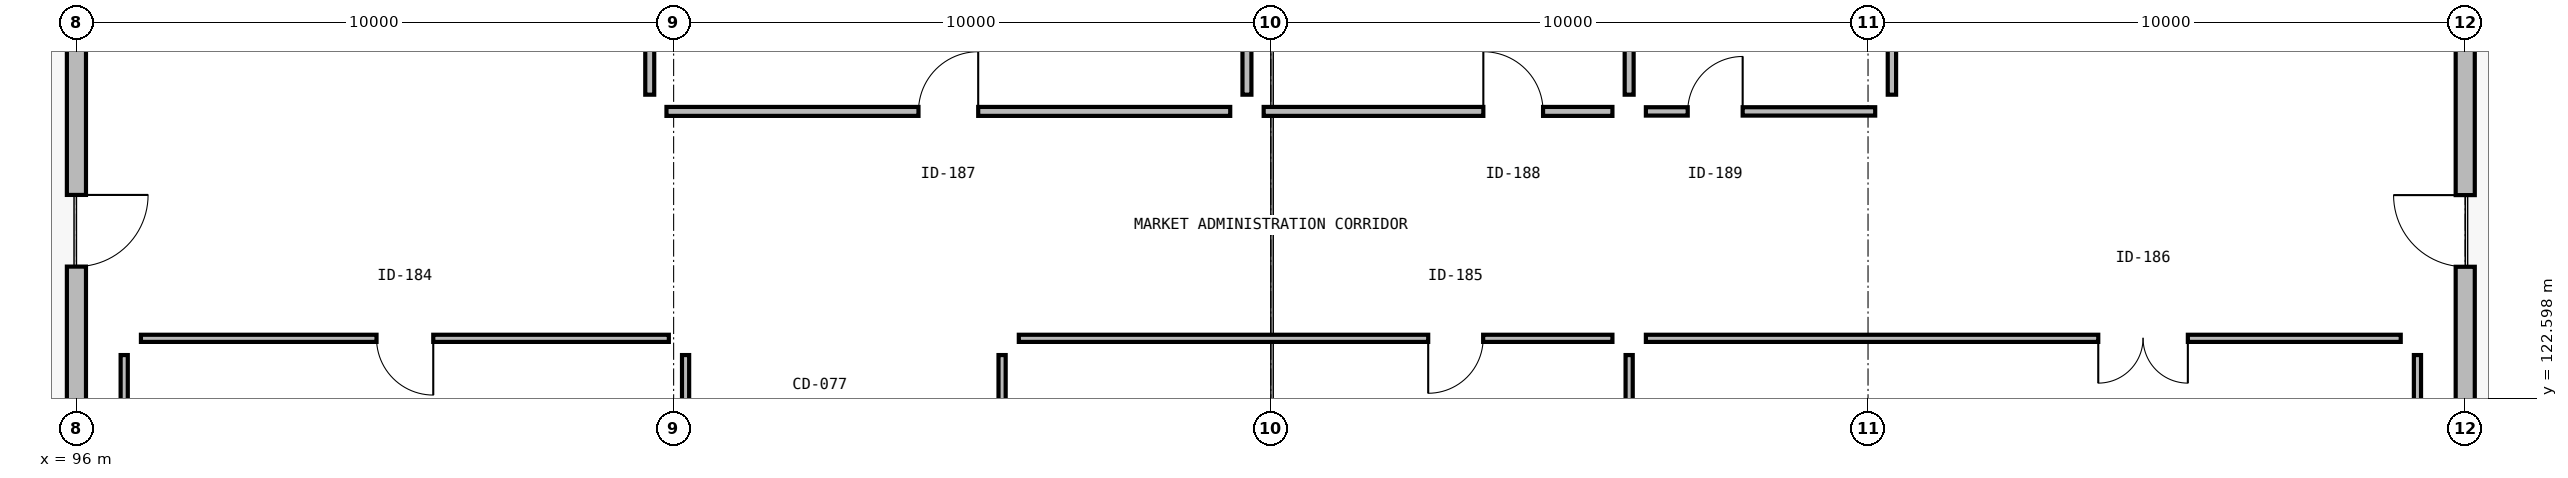
"""IFC4 building model, lengths in metres.
Left out: names, types, materials, properties, quantities, classifications, styles, units other than length and angle.
Written with IfcOpenShell. Run it as: python <this file> out.ifc"""

import sys

from ifc_helpers import new_model, si_unit, direction, frame, frame_2d, origin, place, context, subcontext, project, spatial, rectangle, extrude, element, fill, save


model = new_model("IFC4")
c1 = context("Model", 3, precision=1e-05, world=origin(), true_north=direction((0.0, 1.0)))
c2 = subcontext(c1, "Body", "Model", "MODEL_VIEW")
j1 = project(units=[si_unit("LENGTHUNIT", "METRE"), si_unit("PLANEANGLEUNIT", "RADIAN")], contexts=[c1])
p1 = place(None, origin())
s1 = spatial("IfcSite", under=j1, at=p1, CompositionType="ELEMENT")
p2 = place(p1, origin())
s2 = spatial("IfcBuilding", under=s1, at=p2, CompositionType="ELEMENT")
p3 = place(p2, frame((0.0, 0.0, 15.3)))
s3 = spatial("IfcBuildingStorey", under=s2, at=p3, CompositionType="ELEMENT", Elevation=15.3)
p4 = place(p3, frame((96.0, 129.52, 0.0), z_axis=(0.0, 0.0, 1.0), x_axis=(0.0, -1.0, 0.0)))
e1 = element("IfcWall", 1, at=p4, inside=s3, PredefinedType="SOLIDWALL", context=c2, shape_type="SweptSolid", body=[
    extrude(rectangle(XDim=8.237, YDim=0.32, at=frame_2d((4.119, 0.0), x_axis=(1.0, 0.0))), origin(), (0.0, 0.0, 1.0), 2.94),
])
p5 = place(p4, frame((3.519, 0.0, 0.0)))
e2 = element("IfcOpeningElement", 2, at=p5, cuts=e1, PredefinedType="OPENING", context=c2, shape_type="SweptSolid", body=[
    extrude(rectangle(XDim=1.2, YDim=2.2, at=frame_2d((0.6, 1.1), x_axis=(1.0, 0.0))), frame((0.0, 0.17, 0.0), z_axis=(0.0, -1.0, 0.0), x_axis=(1.0, 0.0, 0.0)), (0.0, 0.0, 1.0), 0.34),
])
p6 = place(p3, frame((136.0, 121.306, 0.0), z_axis=(0.0, 0.0, 1.0), x_axis=(0.0, 1.0, 0.0)))
e3 = element("IfcWall", 3, at=p6, inside=s3, PredefinedType="SOLIDWALL", context=c2, shape_type="SweptSolid", body=[
    extrude(rectangle(XDim=8.186, YDim=0.32, at=frame_2d((4.093, 0.0), x_axis=(1.0, 0.0))), origin(), (0.0, 0.0, 1.0), 2.94),
])
p7 = place(p6, frame((3.493, 0.0, 0.0)))
e4 = element("IfcOpeningElement", 4, at=p7, cuts=e3, PredefinedType="OPENING", context=c2, shape_type="SweptSolid", body=[
    extrude(rectangle(XDim=1.2, YDim=2.2, at=frame_2d((0.6, 1.1), x_axis=(1.0, 0.0))), frame((0.0, 0.17, 0.0), z_axis=(0.0, -1.0, 0.0), x_axis=(1.0, 0.0, 0.0)), (0.0, 0.0, 1.0), 0.34),
])
p8 = place(p3, frame((106.2, 113.68, 0.0), z_axis=(0.0, 0.0, 1.0), x_axis=(0.0, 1.0, 0.0)))
e5 = element("IfcWall", 5, at=p8, inside=s3, PredefinedType="PARTITIONING", context=c2, shape_type="SweptSolid", body=[
    extrude(rectangle(XDim=9.64, YDim=0.12, at=frame_2d((4.82, 0.0), x_axis=(1.0, 0.0))), origin(), (0.0, 0.0, 1.0), 2.47),
])
p9 = place(p3, frame((105.92, 123.6, 0.0), z_axis=(0.0, 0.0, 1.0), x_axis=(-1.0, 0.0, 0.0)))
e6 = element("IfcWall", 6, at=p9, inside=s3, PredefinedType="PARTITIONING", context=c2, shape_type="SweptSolid", body=[
    extrude(rectangle(XDim=8.84, YDim=0.12, at=frame_2d((4.42, 0.0), x_axis=(1.0, 0.0))), origin(), (0.0, 0.0, 1.0), 2.47),
])
p10 = place(p9, frame((3.945, 0.0, 0.0)))
e7 = element("IfcOpeningElement", 7, at=p10, cuts=e6, PredefinedType="OPENING", context=c2, shape_type="SweptSolid", body=[
    extrude(rectangle(XDim=0.95, YDim=2.15, at=frame_2d((0.475, 1.075), x_axis=(1.0, 0.0))), frame((0.0, 0.07, 0.0), z_axis=(0.0, -1.0, 0.0), x_axis=(1.0, 0.0, 0.0)), (0.0, 0.0, 1.0), 0.14),
])
for number, where, z_axis, x_axis in (
    (8, (96.8, 123.32, 0.0), (0.0, 0.0, 1.0), (0.0, -1.0, 0.0)),
    (9, (122.0, 113.68, 0.0), (0.0, 0.0, 1.0), (0.0, 1.0, 0.0)),
):
    element("IfcWall", number, at=place(p3, frame(where, z_axis=z_axis, x_axis=x_axis)), inside=s3, PredefinedType="PARTITIONING", context=c2, shape_type="SweptSolid", body=[
        extrude(rectangle(XDim=9.64, YDim=0.12, at=frame_2d((4.82, 0.0), x_axis=(1.0, 0.0))), origin(), (0.0, 0.0, 1.0), 2.47),
    ])
p11 = place(p3, frame((121.72, 123.6, 0.0), z_axis=(0.0, 0.0, 1.0), x_axis=(-1.0, 0.0, 0.0)))
e10 = element("IfcWall", 10, at=p11, inside=s3, PredefinedType="PARTITIONING", context=c2, shape_type="SweptSolid", body=[
    extrude(rectangle(XDim=9.94, YDim=0.12, at=frame_2d((4.97, 0.0), x_axis=(1.0, 0.0))), origin(), (0.0, 0.0, 1.0), 2.47),
])
p12 = place(p11, frame((2.165, 0.0, 0.0)))
e11 = element("IfcOpeningElement", 11, at=p12, cuts=e10, PredefinedType="OPENING", context=c2, shape_type="SweptSolid", body=[
    extrude(rectangle(XDim=0.92, YDim=2.15, at=frame_2d((0.46, 1.075), x_axis=(1.0, 0.0))), frame((0.0, 0.07, 0.0), z_axis=(0.0, -1.0, 0.0), x_axis=(1.0, 0.0, 0.0)), (0.0, 0.0, 1.0), 0.14),
])
for number, where, z_axis, x_axis in (
    (12, (111.5, 123.32, 0.0), (0.0, 0.0, 1.0), (0.0, -1.0, 0.0)),
    (13, (135.2, 113.68, 0.0), (0.0, 0.0, 1.0), (0.0, 1.0, 0.0)),
):
    element("IfcWall", number, at=place(p3, frame(where, z_axis=z_axis, x_axis=x_axis)), inside=s3, PredefinedType="PARTITIONING", context=c2, shape_type="SweptSolid", body=[
        extrude(rectangle(XDim=9.64, YDim=0.12, at=frame_2d((4.82, 0.0), x_axis=(1.0, 0.0))), origin(), (0.0, 0.0, 1.0), 2.47),
    ])
p13 = place(p3, frame((134.92, 123.6, 0.0), z_axis=(0.0, 0.0, 1.0), x_axis=(-1.0, 0.0, 0.0)))
e14 = element("IfcWall", 14, at=p13, inside=s3, PredefinedType="PARTITIONING", context=c2, shape_type="SweptSolid", body=[
    extrude(rectangle(XDim=12.64, YDim=0.12, at=frame_2d((6.32, 0.0), x_axis=(1.0, 0.0))), origin(), (0.0, 0.0, 1.0), 2.47),
])
p14 = place(p13, frame((3.565, 0.0, 0.0)))
e15 = element("IfcOpeningElement", 15, at=p14, cuts=e14, PredefinedType="OPENING", context=c2, shape_type="SweptSolid", body=[
    extrude(rectangle(XDim=1.5, YDim=2.25, at=frame_2d((0.75, 1.125), x_axis=(1.0, 0.0))), frame((0.0, 0.07, 0.0), z_axis=(0.0, -1.0, 0.0), x_axis=(1.0, 0.0, 0.0)), (0.0, 0.0, 1.0), 0.14),
])
p15 = place(p3, frame((105.88, 127.4, 0.0), z_axis=(0.0, 0.0, 1.0), x_axis=(1.0, 0.0, 0.0)))
e16 = element("IfcWall", 16, at=p15, inside=s3, PredefinedType="PARTITIONING", context=c2, shape_type="SweptSolid", body=[
    extrude(rectangle(XDim=9.44, YDim=0.15, at=frame_2d((4.72, 0.0), x_axis=(1.0, 0.0))), origin(), (0.0, 0.0, 1.0), 2.47),
])
p16 = place(p15, frame((4.22, 0.0, 0.0)))
e17 = element("IfcOpeningElement", 17, at=p16, cuts=e16, PredefinedType="OPENING", context=c2, shape_type="SweptSolid", body=[
    extrude(rectangle(XDim=1.0, YDim=2.15, at=frame_2d((0.5, 1.075), x_axis=(1.0, 0.0))), frame((0.0, 0.085, 0.0), z_axis=(0.0, -1.0, 0.0), x_axis=(1.0, 0.0, 0.0)), (0.0, 0.0, 1.0), 0.17),
])
for number, where, z_axis, x_axis in (
    (18, (115.6, 127.68, 0.0), (0.0, 0.0, 1.0), (0.0, 1.0, 0.0)),
    (19, (105.6, 136.92, 0.0), (0.0, 0.0, 1.0), (0.0, -1.0, 0.0)),
):
    element("IfcWall", number, at=place(p3, frame(where, z_axis=z_axis, x_axis=x_axis)), inside=s3, PredefinedType="PARTITIONING", context=c2, shape_type="SweptSolid", body=[
        extrude(rectangle(XDim=9.24, YDim=0.15, at=frame_2d((4.62, 0.0), x_axis=(1.0, 0.0))), origin(), (0.0, 0.0, 1.0), 2.47),
    ])
p17 = place(p3, frame((115.88, 127.4, 0.0), z_axis=(0.0, 0.0, 1.0), x_axis=(1.0, 0.0, 0.0)))
e20 = element("IfcWall", 20, at=p17, inside=s3, PredefinedType="PARTITIONING", context=c2, shape_type="SweptSolid", body=[
    extrude(rectangle(XDim=5.84, YDim=0.15, at=frame_2d((2.92, 0.0), x_axis=(1.0, 0.0))), origin(), (0.0, 0.0, 1.0), 2.47),
])
p18 = place(p17, frame((3.678, 0.0, 0.0)))
e21 = element("IfcOpeningElement", 21, at=p18, cuts=e20, PredefinedType="OPENING", context=c2, shape_type="SweptSolid", body=[
    extrude(rectangle(XDim=1.0, YDim=2.15, at=frame_2d((0.5, 1.075), x_axis=(1.0, 0.0))), frame((0.0, 0.085, 0.0), z_axis=(0.0, -1.0, 0.0), x_axis=(1.0, 0.0, 0.0)), (0.0, 0.0, 1.0), 0.17),
])
p19 = place(p3, frame((122.0, 127.68, 0.0), z_axis=(0.0, 0.0, 1.0), x_axis=(0.0, 1.0, 0.0)))
e22 = element("IfcWall", 22, at=p19, inside=s3, PredefinedType="PARTITIONING", context=c2, shape_type="SweptSolid", body=[
    extrude(rectangle(XDim=9.24, YDim=0.15, at=frame_2d((4.62, 0.0), x_axis=(1.0, 0.0))), origin(), (0.0, 0.0, 1.0), 2.47),
])
p20 = place(p3, frame((122.28, 127.4, 0.0), z_axis=(0.0, 0.0, 1.0), x_axis=(1.0, 0.0, 0.0)))
e23 = element("IfcWall", 23, at=p20, inside=s3, PredefinedType="PLUMBINGWALL", context=c2, shape_type="SweptSolid", body=[
    extrude(rectangle(XDim=3.84, YDim=0.14, at=frame_2d((1.92, 0.0), x_axis=(1.0, 0.0))), origin(), (0.0, 0.0, 1.0), 2.47),
])
p21 = place(p20, frame((0.701, 0.0, 0.0)))
e24 = element("IfcOpeningElement", 24, at=p21, cuts=e23, PredefinedType="OPENING", context=c2, shape_type="SweptSolid", body=[
    extrude(rectangle(XDim=0.92, YDim=2.15, at=frame_2d((0.46, 1.075), x_axis=(1.0, 0.0))), frame((0.0, 0.08, 0.0), z_axis=(0.0, -1.0, 0.0), x_axis=(1.0, 0.0, 0.0)), (0.0, 0.0, 1.0), 0.16),
])
p22 = place(p3, frame((126.4, 127.68, 0.0), z_axis=(0.0, 0.0, 1.0), x_axis=(0.0, 1.0, 0.0)))
e25 = element("IfcWall", 25, at=p22, inside=s3, PredefinedType="PLUMBINGWALL", context=c2, shape_type="SweptSolid", body=[
    extrude(rectangle(XDim=9.24, YDim=0.14, at=frame_2d((4.62, 0.0), x_axis=(1.0, 0.0))), origin(), (0.0, 0.0, 1.0), 2.47),
])
p23 = place(p5, origin())
e26 = element("IfcDoor", 26, at=p23, inside=s3, OperationType="SINGLE_SWING_LEFT", PredefinedType="DOOR", context=c2, shape_type="SweptSolid", body=[
    extrude(rectangle(XDim=1.2, YDim=2.2, at=frame_2d((0.6, 1.1), x_axis=(1.0, 0.0))), frame((0.0, 0.025, 0.0), z_axis=(0.0, -1.0, 0.0), x_axis=(1.0, 0.0, 0.0)), (0.0, 0.0, 1.0), 0.05),
])
fill(e2, e26)
p24 = place(p7, origin())
e27 = element("IfcDoor", 27, at=p24, inside=s3, OperationType="SINGLE_SWING_RIGHT", PredefinedType="DOOR", context=c2, shape_type="SweptSolid", body=[
    extrude(rectangle(XDim=1.2, YDim=2.2, at=frame_2d((0.6, 1.1), x_axis=(1.0, 0.0))), frame((0.0, 0.025, 0.0), z_axis=(0.0, -1.0, 0.0), x_axis=(1.0, 0.0, 0.0)), (0.0, 0.0, 1.0), 0.05),
])
fill(e4, e27)
p25 = place(p10, origin())
e28 = element("IfcDoor", 28, at=p25, inside=s3, OperationType="SINGLE_SWING_LEFT", PredefinedType="DOOR", context=c2, shape_type="SweptSolid", body=[
    extrude(rectangle(XDim=0.95, YDim=2.15, at=frame_2d((0.475, 1.075), x_axis=(1.0, 0.0))), frame((0.0, 0.025, 0.0), z_axis=(0.0, -1.0, 0.0), x_axis=(1.0, 0.0, 0.0)), (0.0, 0.0, 1.0), 0.05),
])
fill(e7, e28)
p26 = place(p12, origin())
e29 = element("IfcDoor", 29, at=p26, inside=s3, OperationType="SINGLE_SWING_RIGHT", PredefinedType="DOOR", context=c2, shape_type="SweptSolid", body=[
    extrude(rectangle(XDim=0.92, YDim=2.15, at=frame_2d((0.46, 1.075), x_axis=(1.0, 0.0))), frame((0.0, 0.025, 0.0), z_axis=(0.0, -1.0, 0.0), x_axis=(1.0, 0.0, 0.0)), (0.0, 0.0, 1.0), 0.05),
])
fill(e11, e29)
p27 = place(p14, origin())
e30 = element("IfcDoor", 30, at=p27, inside=s3, OperationType="DOUBLE_SWING_LEFT", PredefinedType="DOOR", context=c2, shape_type="SweptSolid", body=[
    extrude(rectangle(XDim=1.5, YDim=2.25, at=frame_2d((0.75, 1.125), x_axis=(1.0, 0.0))), frame((0.0, 0.025, 0.0), z_axis=(0.0, -1.0, 0.0), x_axis=(1.0, 0.0, 0.0)), (0.0, 0.0, 1.0), 0.05),
])
fill(e15, e30)
p28 = place(p16, origin())
e31 = element("IfcDoor", 31, at=p28, inside=s3, OperationType="SINGLE_SWING_RIGHT", PredefinedType="DOOR", context=c2, shape_type="SweptSolid", body=[
    extrude(rectangle(XDim=1.0, YDim=2.15, at=frame_2d((0.5, 1.075), x_axis=(1.0, 0.0))), frame((0.0, 0.025, 0.0), z_axis=(0.0, -1.0, 0.0), x_axis=(1.0, 0.0, 0.0)), (0.0, 0.0, 1.0), 0.05),
])
fill(e17, e31)
p29 = place(p18, origin())
e32 = element("IfcDoor", 32, at=p29, inside=s3, OperationType="SINGLE_SWING_LEFT", PredefinedType="DOOR", context=c2, shape_type="SweptSolid", body=[
    extrude(rectangle(XDim=1.0, YDim=2.15, at=frame_2d((0.5, 1.075), x_axis=(1.0, 0.0))), frame((0.0, 0.025, 0.0), z_axis=(0.0, -1.0, 0.0), x_axis=(1.0, 0.0, 0.0)), (0.0, 0.0, 1.0), 0.05),
])
fill(e21, e32)
p30 = place(p21, origin())
e33 = element("IfcDoor", 33, at=p30, inside=s3, OperationType="SINGLE_SWING_RIGHT", PredefinedType="DOOR", context=c2, shape_type="SweptSolid", body=[
    extrude(rectangle(XDim=0.92, YDim=2.15, at=frame_2d((0.46, 1.075), x_axis=(1.0, 0.0))), frame((0.0, 0.025, 0.0), z_axis=(0.0, -1.0, 0.0), x_axis=(1.0, 0.0, 0.0)), (0.0, 0.0, 1.0), 0.05),
])
fill(e24, e33)
save(model, sys.argv[1])
